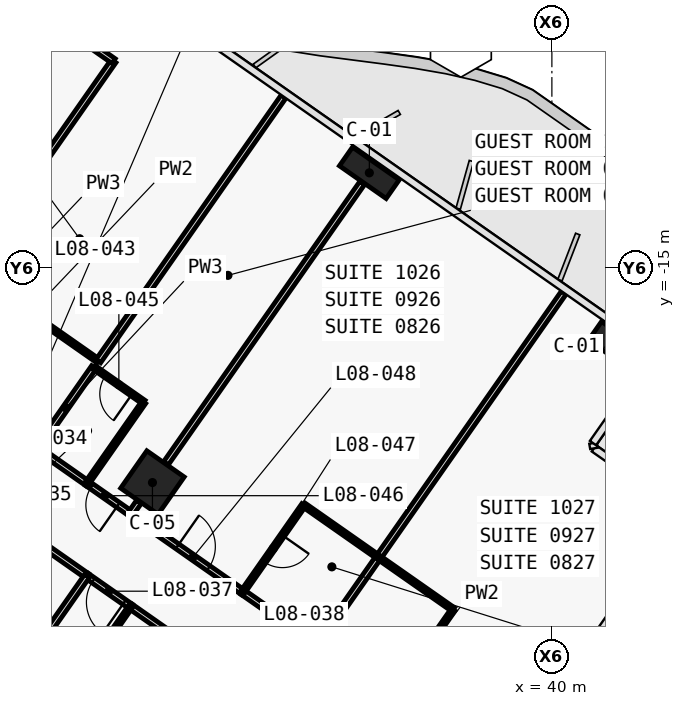
"""IFC4 building model, lengths in metres.
Left out: names, types, materials, properties, quantities, classifications, styles, units other than length and angle.
Written with IfcOpenShell. Run it as: python <this file> out.ifc"""

import sys

from ifc_helpers import new_model, si_unit, direction, frame, frame_2d, origin, origin_2d, place, context, subcontext, project, spatial, polyline, rectangle, outline, extrude, element, fill, save


model = new_model("IFC4")
c1 = context("Model", 3, precision=1e-05, world=origin(), true_north=direction((0.0, 1.0)))
c2 = subcontext(c1, "Body", "Model", "MODEL_VIEW")
j1 = project(units=[si_unit("LENGTHUNIT", "METRE"), si_unit("PLANEANGLEUNIT", "RADIAN")], contexts=[c1])
p1 = place(None, origin())
s1 = spatial("IfcSite", under=j1, at=p1, CompositionType="ELEMENT")
p2 = place(p1, origin())
s2 = spatial("IfcBuilding", under=s1, at=p2, CompositionType="ELEMENT")
p3 = place(p2, frame((0.0, 0.0, 54.5)))
s3 = spatial("IfcBuildingStorey", under=s2, at=p3, CompositionType="ELEMENT", Elevation=54.5)
p4 = place(p3, frame((21.708, -15.2, 0.0), z_axis=(0.0, 0.0, 1.0), x_axis=(0.573576324356, 0.819152122709, 0.0)))
e1 = element("IfcWall", 1, at=p4, inside=s3, PredefinedType="SHEAR", context=c2, shape_type="SweptSolid", body=[
    extrude(outline(polyline([(9.2, 0.5), (0.0, 0.5), (0.0, -0.5), (9.2, -0.5), (9.2, 0.5)])), origin(), (0.0, 0.0, 1.0), 3.6),
])
p5 = place(p4, frame((6.1, 0.0, 0.0)))
e2 = element("IfcOpeningElement", 2, at=p5, cuts=e1, PredefinedType="OPENING", context=c2, shape_type="SweptSolid", body=[
    extrude(rectangle(XDim=1.8, YDim=2.1, at=frame_2d((0.9, 1.05))), frame((0.0, 0.51, 0.0), z_axis=(0.0, -1.0, 0.0), x_axis=(1.0, 0.0, 0.0)), (0.0, 0.0, 1.0), 1.02),
])
p6 = place(p4, frame((1.9, 0.0, 0.0)))
e3 = element("IfcOpeningElement", 3, at=p6, cuts=e1, PredefinedType="OPENING", context=c2, shape_type="SweptSolid", body=[
    extrude(rectangle(XDim=1.8, YDim=2.1, at=frame_2d((0.9, 1.05))), frame((0.0, 0.51, 0.0), z_axis=(0.0, -1.0, 0.0), x_axis=(1.0, 0.0, 0.0)), (0.0, 0.0, 1.0), 1.02),
])
for number, where, z_axis, x_axis in (
    (4, (35.197, -12.498, 0.0), (0.0, 0.0, 1.0), (0.819, -0.574, 0.0)),
    (5, (41.75, -17.087, 0.0), (0.0, 0.0, 1.0), (0.819, -0.574, 0.0)),
):
    element("IfcColumn", number, at=place(p3, frame(where, z_axis=z_axis, x_axis=x_axis)), inside=s3, PredefinedType="COLUMN", context=c2, shape_type="SweptSolid", body=[
        extrude(rectangle(XDim=1.5, YDim=0.6, at=origin_2d()), origin(), (0.0, 0.0, 1.0), 3.6),
    ])
p7 = place(p3, frame((29.49, -20.649, 0.0), z_axis=(0.0, 0.0, 1.0), x_axis=(0.819152044289, -0.573576436351, 0.0)))
e6 = element("IfcColumn", 6, at=p7, inside=s3, PredefinedType="COLUMN", context=c2, shape_type="SweptSolid", body=[
    extrude(rectangle(XDim=1.2, YDim=1.2, at=origin_2d()), origin(), (0.0, 0.0, 1.0), 3.6),
])
p8 = place(p3, frame((28.917, -21.469, 0.0), z_axis=(0.0, 0.0, 1.0), x_axis=(-0.81914197737, 0.573590813132, 0.0)))
e7 = element("IfcWall", 7, at=p8, inside=s3, PredefinedType="PARTITIONING", context=c2, shape_type="SweptSolid", body=[
    extrude(rectangle(XDim=1.403, YDim=0.15, at=frame_2d((0.701, 0.0))), origin(), (0.0, 0.0, 1.0), 2.6),
])
p9 = place(p8, frame((0.403, 0.0, 0.0)))
e8 = element("IfcOpeningElement", 8, at=p9, cuts=e7, PredefinedType="OPENING", context=c2, shape_type="SweptSolid", body=[
    extrude(rectangle(XDim=0.85, YDim=2.1, at=frame_2d((0.425, 1.05))), frame((0.0, 0.085, 0.0), z_axis=(0.0, -1.0, 0.0), x_axis=(1.0, 0.0, 0.0)), (0.0, 0.0, 1.0), 0.17),
])
p10 = place(p3, frame((26.457, -19.746, 0.0), z_axis=(0.0, 0.0, 1.0), x_axis=(0.819189013667, -0.573523634986, 0.0)))
e9 = element("IfcWall", 9, at=p10, inside=s3, PredefinedType="PARTITIONING", context=c2, shape_type="SweptSolid", body=[
    extrude(rectangle(XDim=1.604, YDim=0.15, at=frame_2d((0.802, 0.0))), origin(), (0.0, 0.0, 1.0), 3.32),
])
p11 = place(p3, frame((28.914, -21.467, 0.0), z_axis=(0.0, 0.0, 1.0), x_axis=(0.819145961204, -0.573585123798, 0.0)))
e10 = element("IfcWall", 10, at=p11, inside=s3, PredefinedType="PARTITIONING", context=c2, shape_type="SweptSolid", body=[
    extrude(rectangle(XDim=3.603, YDim=0.15, at=frame_2d((1.802, 0.0))), origin(), (0.0, 0.0, 1.0), 2.6),
])
p12 = place(p11, frame((1.502, 0.0, 0.0)))
e11 = element("IfcOpeningElement", 11, at=p12, cuts=e10, PredefinedType="OPENING", context=c2, shape_type="SweptSolid", body=[
    extrude(rectangle(XDim=1.0, YDim=2.1, at=frame_2d((0.5, 1.05))), frame((0.0, 0.085, 0.0), z_axis=(0.0, -1.0, 0.0), x_axis=(1.0, 0.0, 0.0)), (0.0, 0.0, 1.0), 0.17),
])
p13 = place(p3, frame((31.863, -23.531, 0.0), z_axis=(0.0, 0.0, 1.0), x_axis=(0.819146032251, -0.573585022335, 0.0)))
e12 = element("IfcWall", 12, at=p13, inside=s3, PredefinedType="PARTITIONING", context=c2, shape_type="SweptSolid", body=[
    extrude(rectangle(XDim=2.404, YDim=0.15, at=frame_2d((1.202, 0.0))), origin(), (0.0, 0.0, 1.0), 3.32),
])
p14 = place(p3, frame((27.771, -23.107, 0.0), z_axis=(0.0, 0.0, 1.0), x_axis=(-0.819145961204, 0.573585123798, 0.0)))
e13 = element("IfcWall", 13, at=p14, inside=s3, PredefinedType="PARTITIONING", context=c2, shape_type="SweptSolid", body=[
    extrude(rectangle(XDim=3.603, YDim=0.15, at=frame_2d((1.802, 0.0))), origin(), (0.0, 0.0, 1.0), 2.6),
])
p15 = place(p14, frame((1.302, 0.0, 0.0)))
e14 = element("IfcOpeningElement", 14, at=p15, cuts=e13, PredefinedType="OPENING", context=c2, shape_type="SweptSolid", body=[
    extrude(rectangle(XDim=1.0, YDim=2.1, at=frame_2d((0.5, 1.05))), frame((0.0, 0.085, 0.0), z_axis=(0.0, -1.0, 0.0), x_axis=(1.0, 0.0, 0.0)), (0.0, 0.0, 1.0), 0.17),
])
p16 = place(p3, frame((28.917, -23.91, 0.0), z_axis=(0.0, 0.0, 1.0), x_axis=(-0.819117471667, 0.573625808005, 0.0)))
e15 = element("IfcWall", 15, at=p16, inside=s3, PredefinedType="PARTITIONING", context=c2, shape_type="SweptSolid", body=[
    extrude(rectangle(XDim=1.403, YDim=0.15, at=frame_2d((0.702, 0.0))), origin(), (0.0, 0.0, 1.0), 2.6),
])
p17 = place(p16, frame((0.201, 0.0, 0.0)))
e16 = element("IfcOpeningElement", 16, at=p17, cuts=e15, PredefinedType="OPENING", context=c2, shape_type="SweptSolid", body=[
    extrude(rectangle(XDim=1.0, YDim=2.1, at=frame_2d((0.5, 1.05))), frame((0.0, 0.085, 0.0), z_axis=(0.0, -1.0, 0.0), x_axis=(1.0, 0.0, 0.0)), (0.0, 0.0, 1.0), 0.17),
])
p18 = place(p3, frame((30.228, -24.828, 0.0), z_axis=(0.0, 0.0, 1.0), x_axis=(-0.819189013667, 0.573523634986, 0.0)))
e17 = element("IfcWall", 17, at=p18, inside=s3, PredefinedType="PARTITIONING", context=c2, shape_type="SweptSolid", body=[
    extrude(rectangle(XDim=1.604, YDim=0.15, at=frame_2d((0.802, 0.0))), origin(), (0.0, 0.0, 1.0), 3.32),
])
p19 = place(p3, frame((28.065, -17.453, 0.0), z_axis=(0.0, 0.0, 1.0), x_axis=(-0.819155442668, 0.573571582932, 0.0)))
e18 = element("IfcWall", 18, at=p19, inside=s3, PredefinedType="PARTITIONING", context=c2, shape_type="SweptSolid", body=[
    extrude(rectangle(XDim=2.4, YDim=0.12, at=frame_2d((1.2, 0.0))), origin(), (0.0, 0.0, 1.0), 3.32),
])
p20 = place(p3, frame((32.94, -10.491, 0.0), z_axis=(0.0, 0.0, 1.0), x_axis=(-0.573593433868, -0.819140142237, 0.0)))
e19 = element("IfcWall", 19, at=p20, inside=s3, PredefinedType="PARTITIONING", context=c2, shape_type="SweptSolid", body=[
    extrude(rectangle(XDim=8.499, YDim=0.15, at=frame_2d((4.25, 0.0))), origin(), (0.0, 0.0, 1.0), 2.6),
])
p21 = place(p3, frame((26.746, -12.014, 0.0), z_axis=(0.0, 0.0, 1.0), x_axis=(0.573560650686, 0.819163097304, 0.0)))
e20 = element("IfcWall", 20, at=p21, inside=s3, PredefinedType="PARTITIONING", context=c2, shape_type="SweptSolid", body=[
    extrude(rectangle(XDim=3.0, YDim=0.15, at=frame_2d((1.5, 0.0))), origin(), (0.0, 0.0, 1.0), 3.32),
])
p22 = place(p3, frame((28.467, -9.556, 0.0), z_axis=(0.0, 0.0, 1.0), x_axis=(-0.819109000826, 0.573637903879, 0.0)))
e21 = element("IfcWall", 21, at=p22, inside=s3, PredefinedType="PARTITIONING", context=c2, shape_type="SweptSolid", body=[
    extrude(rectangle(XDim=1.68, YDim=0.15, at=frame_2d((0.84, 0.0))), origin(), (0.0, 0.0, 1.0), 3.32),
])
p23 = place(p3, frame((27.951, -17.616, 0.0), z_axis=(0.0, 0.0, 1.0), x_axis=(-0.573544201094, -0.819174614714, 0.0)))
e22 = element("IfcWall", 22, at=p23, inside=s3, PredefinedType="PARTITIONING", context=c2, shape_type="SweptSolid", body=[
    extrude(rectangle(XDim=2.602, YDim=0.15, at=frame_2d((1.301, 0.0))), origin(), (0.0, 0.0, 1.0), 2.6),
])
p24 = place(p3, frame((27.77, -20.666, 0.0), z_axis=(0.0, 0.0, 1.0), x_axis=(0.573537965655, 0.819178980414, 0.0)))
e23 = element("IfcWall", 23, at=p24, inside=s3, PredefinedType="PARTITIONING", context=c2, shape_type="SweptSolid", body=[
    extrude(rectangle(XDim=2.6, YDim=0.12, at=frame_2d((1.3, 0.0))), origin(), (0.0, 0.0, 1.0), 2.6),
])
p25 = place(p3, frame((29.261, -18.534, 0.0), z_axis=(0.0, 0.0, 1.0), x_axis=(-0.819253425856, 0.573431621227, 0.0)))
e24 = element("IfcWall", 24, at=p25, inside=s3, PredefinedType="PARTITIONING", context=c2, shape_type="SweptSolid", body=[
    extrude(rectangle(XDim=1.6, YDim=0.12, at=frame_2d((0.8, 0.0))), origin(), (0.0, 0.0, 1.0), 3.32),
])
p26 = place(p25, frame((0.375, 0.0, 0.0)))
e25 = element("IfcOpeningElement", 25, at=p26, cuts=e24, PredefinedType="OPENING", context=c2, shape_type="SweptSolid", body=[
    extrude(rectangle(XDim=0.85, YDim=2.05, at=frame_2d((0.425, 1.025))), frame((0.0, 0.07, 0.0), z_axis=(0.0, -1.0, 0.0), x_axis=(1.0, 0.0, 0.0)), (0.0, 0.0, 1.0), 0.14),
])
p27 = place(p3, frame((35.013, -12.76, 0.0), z_axis=(0.0, 0.0, 1.0), x_axis=(-0.573558725113, -0.819164445546, 0.0)))
e26 = element("IfcWall", 26, at=p27, inside=s3, PredefinedType="PARTITIONING", context=c2, shape_type="SweptSolid", body=[
    extrude(rectangle(XDim=9.01, YDim=0.15, at=frame_2d((4.505, 0.0))), origin(), (0.0, 0.0, 1.0), 2.6),
])
p28 = place(p3, frame((29.134, -21.156, 0.0), z_axis=(0.0, 0.0, 1.0), x_axis=(-0.572944929411, -0.819593867633, 0.0)))
e27 = element("IfcWall", 27, at=p28, inside=s3, PredefinedType="PARTITIONING", context=c2, shape_type="SweptSolid", body=[
    extrude(rectangle(XDim=0.38, YDim=0.15, at=frame_2d((0.19, 0.0))), origin(), (0.0, 0.0, 1.0), 2.6),
])
p29 = place(p3, frame((35.438, -22.615, 0.0), z_axis=(0.0, 0.0, 1.0), x_axis=(-0.819141114317, 0.573592045652, 0.0)))
e28 = element("IfcWall", 28, at=p29, inside=s3, PredefinedType="PARTITIONING", context=c2, shape_type="SweptSolid", body=[
    extrude(rectangle(XDim=2.4, YDim=0.12, at=frame_2d((1.2, 0.0))), origin(), (0.0, 0.0, 1.0), 3.32),
])
p30 = place(p3, frame((33.47, -21.239, 0.0), z_axis=(0.0, 0.0, 1.0), x_axis=(-0.573550118428, -0.819170471667, 0.0)))
e29 = element("IfcWall", 29, at=p30, inside=s3, PredefinedType="PARTITIONING", context=c2, shape_type="SweptSolid", body=[
    extrude(rectangle(XDim=2.8, YDim=0.12, at=frame_2d((1.4, 0.0))), origin(), (0.0, 0.0, 1.0), 2.6),
])
p31 = place(p30, frame((0.975, 0.0, 0.0)))
e30 = element("IfcOpeningElement", 30, at=p31, cuts=e29, PredefinedType="OPENING", context=c2, shape_type="SweptSolid", body=[
    extrude(rectangle(XDim=0.85, YDim=2.05, at=frame_2d((0.425, 1.025))), frame((0.0, 0.07, 0.0), z_axis=(0.0, -1.0, 0.0), x_axis=(1.0, 0.0, 0.0)), (0.0, 0.0, 1.0), 0.14),
])
p32 = place(p3, frame((40.312, -15.653, 0.0), z_axis=(0.0, 0.0, 1.0), x_axis=(-0.573560662175, -0.81916308926, 0.0)))
e31 = element("IfcWall", 31, at=p32, inside=s3, PredefinedType="PARTITIONING", context=c2, shape_type="SweptSolid", body=[
    extrude(rectangle(XDim=8.499, YDim=0.15, at=frame_2d((4.25, 0.0))), origin(), (0.0, 0.0, 1.0), 2.5),
])
p33 = place(p3, frame((35.437, -22.616, 0.0), z_axis=(0.0, 0.0, 1.0), x_axis=(-0.573550118428, -0.819170471667, 0.0)))
e32 = element("IfcWall", 32, at=p33, inside=s3, PredefinedType="PARTITIONING", context=c2, shape_type="SweptSolid", body=[
    extrude(rectangle(XDim=2.8, YDim=0.15, at=frame_2d((1.4, 0.0))), origin(), (0.0, 0.0, 1.0), 2.6),
])
p34 = place(p3, frame((35.798, -26.287, 0.0), z_axis=(0.0, 0.0, 1.0), x_axis=(0.573550118428, 0.819170471667, 0.0)))
e33 = element("IfcWall", 33, at=p34, inside=s3, PredefinedType="PARTITIONING", context=c2, shape_type="SweptSolid", body=[
    extrude(rectangle(XDim=2.8, YDim=0.12, at=frame_2d((1.4, 0.0))), origin(), (0.0, 0.0, 1.0), 2.6),
])
p35 = place(p34, frame((0.975, 0.0, 0.0)))
e34 = element("IfcOpeningElement", 34, at=p35, cuts=e33, PredefinedType="OPENING", context=c2, shape_type="SweptSolid", body=[
    extrude(rectangle(XDim=0.85, YDim=2.05, at=frame_2d((0.425, 1.025))), frame((0.0, 0.07, 0.0), z_axis=(0.0, -1.0, 0.0), x_axis=(1.0, 0.0, 0.0)), (0.0, 0.0, 1.0), 0.14),
])
p36 = place(p3, frame((37.403, -23.991, 0.0), z_axis=(0.0, 0.0, 1.0), x_axis=(-0.819155442668, 0.573571582932, 0.0)))
e35 = element("IfcWall", 35, at=p36, inside=s3, PredefinedType="PARTITIONING", context=c2, shape_type="SweptSolid", body=[
    extrude(rectangle(XDim=2.4, YDim=0.12, at=frame_2d((1.2, 0.0))), origin(), (0.0, 0.0, 1.0), 3.32),
])
p37 = place(p3, frame((27.769, -23.106, 0.0), z_axis=(0.0, 0.0, 1.0), x_axis=(-0.57359826181, -0.819136761505, 0.0)))
e36 = element("IfcWall", 36, at=p37, inside=s3, PredefinedType="PARTITIONING", context=c2, shape_type="SweptSolid", body=[
    extrude(rectangle(XDim=6.63, YDim=0.15, at=frame_2d((3.315, 0.0))), origin(), (0.0, 0.0, 1.0), 2.6),
])
p38 = place(p3, frame((28.915, -23.909, 0.0), z_axis=(0.0, 0.0, 1.0), x_axis=(-0.573645091666, -0.819103967032, 0.0)))
e37 = element("IfcWall", 37, at=p38, inside=s3, PredefinedType="PARTITIONING", context=c2, shape_type="SweptSolid", body=[
    extrude(rectangle(XDim=2.6, YDim=0.12, at=frame_2d((1.3, 0.0))), origin(), (0.0, 0.0, 1.0), 3.32),
])
p39 = place(p38, frame((0.875, 0.0, 0.0)))
e38 = element("IfcOpeningElement", 38, at=p39, cuts=e37, PredefinedType="OPENING", context=c2, shape_type="SweptSolid", body=[
    extrude(rectangle(XDim=0.85, YDim=2.05, at=frame_2d((0.425, 1.025))), frame((0.0, 0.07, 0.0), z_axis=(0.0, -1.0, 0.0), x_axis=(1.0, 0.0, 0.0)), (0.0, 0.0, 1.0), 0.14),
])
p40 = place(p17, origin())
e39 = element("IfcDoor", 39, at=p40, inside=s3, OperationType="SINGLE_SWING_RIGHT", PredefinedType="DOOR", context=c2, shape_type="SweptSolid", body=[
    extrude(rectangle(XDim=1.0, YDim=2.1, at=frame_2d((0.5, 1.05))), frame((0.0, 0.025, 0.0), z_axis=(0.0, -1.0, 0.0), x_axis=(1.0, 0.0, 0.0)), (0.0, 0.0, 1.0), 0.05),
])
fill(e16, e39)
p41 = place(p26, origin())
e40 = element("IfcDoor", 40, at=p41, inside=s3, OperationType="SINGLE_SWING_LEFT", PredefinedType="DOOR", context=c2, shape_type="SweptSolid", body=[
    extrude(rectangle(XDim=0.85, YDim=2.05, at=frame_2d((0.425, 1.025))), frame((0.0, 0.025, 0.0), z_axis=(0.0, -1.0, 0.0), x_axis=(1.0, 0.0, 0.0)), (0.0, 0.0, 1.0), 0.05),
])
fill(e25, e40)
p42 = place(p9, origin())
e41 = element("IfcDoor", 41, at=p42, inside=s3, OperationType="SINGLE_SWING_RIGHT", PredefinedType="DOOR", context=c2, shape_type="SweptSolid", body=[
    extrude(rectangle(XDim=0.85, YDim=2.1, at=frame_2d((0.425, 1.05))), frame((0.0, 0.025, 0.0), z_axis=(0.0, -1.0, 0.0), x_axis=(1.0, 0.0, 0.0)), (0.0, 0.0, 1.0), 0.05),
])
fill(e8, e41)
p43 = place(p31, origin())
e42 = element("IfcDoor", 42, at=p43, inside=s3, OperationType="SINGLE_SWING_LEFT", PredefinedType="DOOR", context=c2, shape_type="SweptSolid", body=[
    extrude(rectangle(XDim=0.85, YDim=2.05, at=frame_2d((0.425, 1.025))), frame((0.0, 0.025, 0.0), z_axis=(0.0, -1.0, 0.0), x_axis=(1.0, 0.0, 0.0)), (0.0, 0.0, 1.0), 0.05),
])
fill(e30, e42)
p44 = place(p12, origin())
e43 = element("IfcDoor", 43, at=p44, inside=s3, OperationType="SINGLE_SWING_RIGHT", PredefinedType="DOOR", context=c2, shape_type="SweptSolid", body=[
    extrude(rectangle(XDim=1.0, YDim=2.1, at=frame_2d((0.5, 1.05))), frame((0.0, 0.025, 0.0), z_axis=(0.0, -1.0, 0.0), x_axis=(1.0, 0.0, 0.0)), (0.0, 0.0, 1.0), 0.05),
])
fill(e11, e43)
save(model, sys.argv[1])
